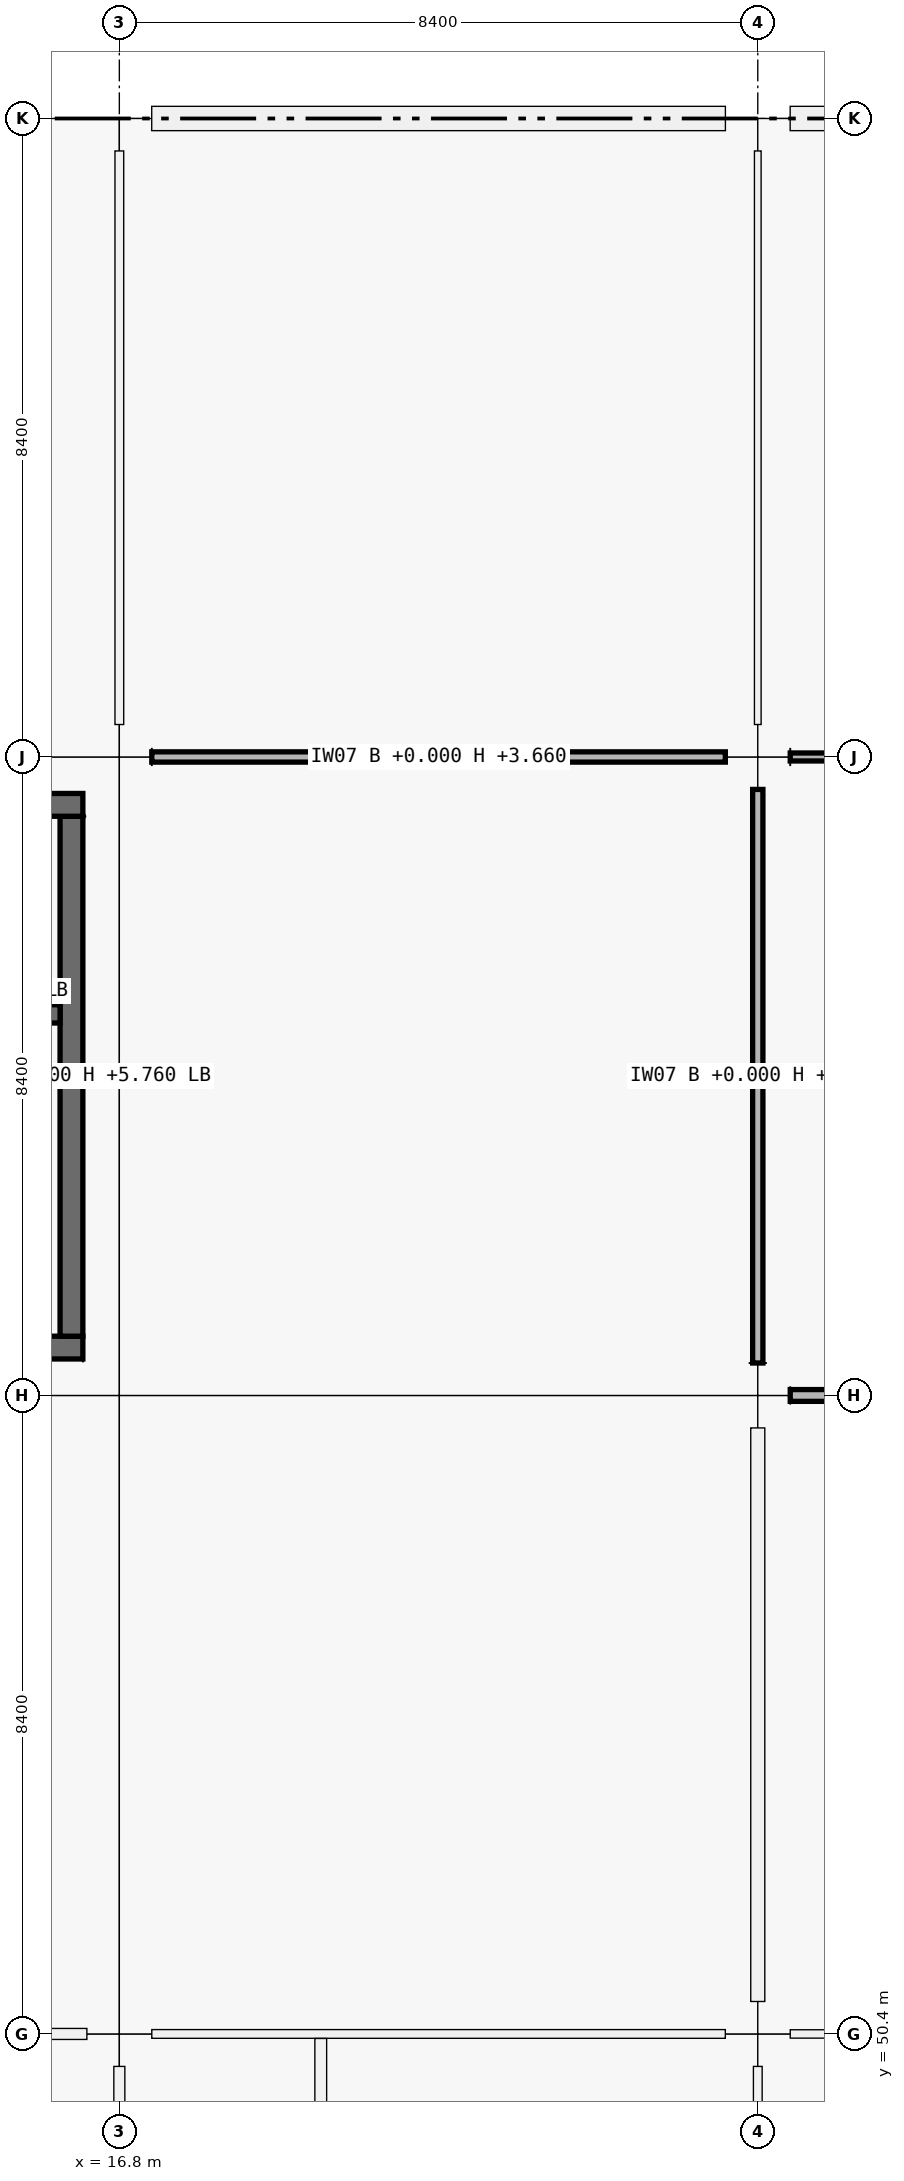
"""IFC4 building model, lengths in metres.
Left out: names, types, materials, properties, quantities, classifications, styles, units other than length and angle.
Written with IfcOpenShell. Run it as: python <this file> out.ifc"""

import sys

from ifc_helpers import new_model, si_unit, direction, frame, frame_2d, origin, origin_2d, place, context, subcontext, project, spatial, rectangle, extrude, element, fill, save


model = new_model("IFC4")
c1 = context("Model", 3, precision=1e-05, world=origin(), true_north=direction((0.0, 1.0)))
c2 = subcontext(c1, "Body", "Model", "MODEL_VIEW")
j1 = project(units=[si_unit("LENGTHUNIT", "METRE"), si_unit("PLANEANGLEUNIT", "RADIAN")], contexts=[c1])
p1 = place(None, origin())
s1 = spatial("IfcSite", under=j1, at=p1, CompositionType="ELEMENT")
p2 = place(p1, origin())
s2 = spatial("IfcBuilding", under=s1, at=p2, CompositionType="ELEMENT")
p3 = place(p2, origin())
s3 = spatial("IfcBuildingStorey", under=s2, at=p3, CompositionType="ELEMENT", Elevation=0.0)
for number, where, z_axis, x_axis in (
    (1, (16.8, 50.4, 0.0), (0.0, 0.0, 1.0), (1.0, 0.0, 0.0)),
    (2, (16.8, 58.8, 0.0), (0.0, 0.0, 1.0), (1.0, 0.0, 0.0)),
    (3, (16.8, 67.2, 0.0), (0.0, 0.0, 1.0), (1.0, 0.0, 0.0)),
    (4, (16.8, 75.6, 0.0), (0.0, 0.0, 1.0), (1.0, 0.0, 0.0)),
    (5, (25.2, 50.4, 0.0), (0.0, 0.0, 1.0), (1.0, 0.0, 0.0)),
    (6, (25.2, 58.8, 0.0), (0.0, 0.0, 1.0), (1.0, 0.0, 0.0)),
    (7, (25.2, 67.2, 0.0), (0.0, 0.0, 1.0), (1.0, 0.0, 0.0)),
    (8, (25.2, 75.6, 0.0), (0.0, 0.0, 1.0), (1.0, 0.0, 0.0)),
):
    element("IfcColumn", number, at=place(p3, frame(where, z_axis=z_axis, x_axis=x_axis)), inside=s3, PredefinedType="COLUMN", context=c2, shape_type="SweptSolid", body=[
        extrude(rectangle(XDim=0.85, YDim=0.85, at=origin_2d()), origin(), (0.0, 0.0, 1.0), 5.76),
    ])
p4 = place(p3, frame((17.226, 75.6, 0.0), z_axis=(0.0, 0.0, 1.0), x_axis=(1.0, 0.0, 0.0)))
e9 = element("IfcWall", 9, at=p4, inside=s3, PredefinedType="SOLIDWALL", context=c2, shape_type="SweptSolid", body=[
    extrude(rectangle(XDim=7.548, YDim=0.32, at=frame_2d((3.774, 0.0))), origin(), (0.0, 0.0, 1.0), 4.7),
])
p5 = place(p4, frame((2.474, 0.0, 0.9)))
e10 = element("IfcOpeningElement", 10, at=p5, cuts=e9, PredefinedType="OPENING", context=c2, shape_type="SweptSolid", body=[
    extrude(rectangle(XDim=2.6, YDim=2.1, at=frame_2d((1.3, 1.05))), frame((0.0, 0.16, 0.0), z_axis=(0.0, -1.0, 0.0), x_axis=(1.0, 0.0, 0.0)), (0.0, 0.0, 1.0), 0.32),
])
p6 = place(p3, frame((25.626, 75.6, 0.0), z_axis=(0.0, 0.0, 1.0), x_axis=(1.0, 0.0, 0.0)))
e11 = element("IfcWall", 11, at=p6, inside=s3, PredefinedType="SOLIDWALL", context=c2, shape_type="SweptSolid", body=[
    extrude(rectangle(XDim=7.548, YDim=0.32, at=frame_2d((3.774, 0.0))), origin(), (0.0, 0.0, 1.0), 4.7),
])
p7 = place(p6, frame((2.374, 0.0, 0.9)))
e12 = element("IfcOpeningElement", 12, at=p7, cuts=e11, PredefinedType="OPENING", context=c2, shape_type="SweptSolid", body=[
    extrude(rectangle(XDim=2.8, YDim=1.75, at=frame_2d((1.4, 0.875))), frame((0.0, 0.16, 0.0), z_axis=(0.0, -1.0, 0.0), x_axis=(1.0, 0.0, 0.0)), (0.0, 0.0, 1.0), 0.32),
])
p8 = place(p3, frame((16.32, 59.43, 0.0), z_axis=(0.0, 0.0, 1.0), x_axis=(-1.0, 0.0, 0.0)))
e13 = element("IfcWall", 13, at=p8, inside=s3, PredefinedType="SHEAR", context=c2, shape_type="SweptSolid", body=[
    extrude(rectangle(XDim=7.44, YDim=0.3, at=frame_2d((3.72, 0.0))), origin(), (0.0, 0.0, 1.0), 5.76),
])
p9 = place(p8, frame((1.28, 0.0, 0.0)))
e14 = element("IfcOpeningElement", 14, at=p9, cuts=e13, PredefinedType="OPENING", context=c2, shape_type="SweptSolid", body=[
    extrude(rectangle(XDim=1.5, YDim=2.15, at=frame_2d((0.75, 1.075))), frame((0.0, 0.15, 0.0), z_axis=(0.0, -1.0, 0.0), x_axis=(1.0, 0.0, 0.0)), (0.0, 0.0, 1.0), 0.3),
])
p10 = place(p3, frame((8.88, 66.57, 0.0), z_axis=(0.0, 0.0, 1.0), x_axis=(1.0, 0.0, 0.0)))
e15 = element("IfcWall", 15, at=p10, inside=s3, PredefinedType="SHEAR", context=c2, shape_type="SweptSolid", body=[
    extrude(rectangle(XDim=7.44, YDim=0.3, at=frame_2d((3.72, 0.0))), origin(), (0.0, 0.0, 1.0), 5.76),
])
p11 = place(p3, frame((16.17, 66.42, 0.0), z_axis=(0.0, 0.0, 1.0), x_axis=(0.0, -1.0, 0.0)))
e16 = element("IfcWall", 16, at=p11, inside=s3, PredefinedType="SHEAR", context=c2, shape_type="SweptSolid", body=[
    extrude(rectangle(XDim=6.84, YDim=0.3, at=frame_2d((3.42, 0.0))), origin(), (0.0, 0.0, 1.0), 5.76),
])
p12 = place(p3, frame((12.56, 63.82, 0.0), z_axis=(0.0, 0.0, 1.0), x_axis=(1.0, 0.0, 0.0)))
e17 = element("IfcWall", 17, at=p12, inside=s3, PredefinedType="SHEAR", context=c2, shape_type="SweptSolid", body=[
    extrude(rectangle(XDim=3.46, YDim=0.24, at=frame_2d((1.73, 0.0))), origin(), (0.0, 0.0, 1.0), 5.76),
])
p13 = place(p12, frame((1.18, 0.0, 0.0)))
e18 = element("IfcOpeningElement", 18, at=p13, cuts=e17, PredefinedType="OPENING", context=c2, shape_type="SweptSolid", body=[
    extrude(rectangle(XDim=1.1, YDim=2.15, at=frame_2d((0.55, 1.075))), frame((0.0, 0.12, 0.0), z_axis=(0.0, -1.0, 0.0), x_axis=(1.0, 0.0, 0.0)), (0.0, 0.0, 1.0), 0.24),
])
p14 = place(p3, frame((8.827, 50.4, 0.0), z_axis=(0.0, 0.0, 1.0), x_axis=(1.0, 0.0, 0.0)))
e19 = element("IfcWall", 19, at=p14, inside=s3, PredefinedType="PARTITIONING", context=c2, shape_type="SweptSolid", body=[
    extrude(rectangle(XDim=7.546, YDim=0.145, at=frame_2d((3.773, 0.0))), origin(), (0.0, 0.0, 1.0), 3.66),
])
p15 = place(p14, frame((3.263, 0.0, 0.0)))
e20 = element("IfcOpeningElement", 20, at=p15, cuts=e19, PredefinedType="OPENING", context=c2, shape_type="SweptSolid", body=[
    extrude(rectangle(XDim=1.02, YDim=2.2, at=frame_2d((0.51, 1.1))), frame((0.0, 0.073, 0.0), z_axis=(0.0, -1.0, 0.0), x_axis=(1.0, 0.0, 0.0)), (0.0, 0.0, 1.0), 0.145),
])
p16 = place(p3, frame((17.227, 50.4, 0.0), z_axis=(0.0, 0.0, 1.0), x_axis=(1.0, 0.0, 0.0)))
e21 = element("IfcWall", 21, at=p16, inside=s3, PredefinedType="PARTITIONING", context=c2, shape_type="SweptSolid", body=[
    extrude(rectangle(XDim=7.546, YDim=0.115, at=frame_2d((3.773, 0.0))), origin(), (0.0, 0.0, 1.0), 3.66),
])
p17 = place(p16, frame((0.578, 0.0, 0.0)))
e22 = element("IfcOpeningElement", 22, at=p17, cuts=e21, PredefinedType="OPENING", context=c2, shape_type="SweptSolid", body=[
    extrude(rectangle(XDim=0.92, YDim=2.1, at=frame_2d((0.46, 1.05))), frame((0.0, 0.058, 0.0), z_axis=(0.0, -1.0, 0.0), x_axis=(1.0, 0.0, 0.0)), (0.0, 0.0, 1.0), 0.115),
])
p18 = place(p16, frame((4.468, 0.0, 0.0)))
e23 = element("IfcOpeningElement", 23, at=p18, cuts=e21, PredefinedType="OPENING", context=c2, shape_type="SweptSolid", body=[
    extrude(rectangle(XDim=0.98, YDim=2.08, at=frame_2d((0.49, 1.04))), frame((0.0, 0.058, 0.0), z_axis=(0.0, -1.0, 0.0), x_axis=(1.0, 0.0, 0.0)), (0.0, 0.0, 1.0), 0.115),
])
p19 = place(p3, frame((17.227, 67.2, 0.0), z_axis=(0.0, 0.0, 1.0), x_axis=(1.0, 0.0, 0.0)))
e24 = element("IfcWall", 24, at=p19, inside=s3, PredefinedType="PARTITIONING", context=c2, shape_type="SweptSolid", body=[
    extrude(rectangle(XDim=7.546, YDim=0.135, at=frame_2d((3.773, 0.0))), origin(), (0.0, 0.0, 1.0), 3.66),
])
p20 = place(p19, frame((3.283, 0.0, 0.0)))
e25 = element("IfcOpeningElement", 25, at=p20, cuts=e24, PredefinedType="OPENING", context=c2, shape_type="SweptSolid", body=[
    extrude(rectangle(XDim=0.98, YDim=2.18, at=frame_2d((0.49, 1.09))), frame((0.0, 0.067, 0.0), z_axis=(0.0, -1.0, 0.0), x_axis=(1.0, 0.0, 0.0)), (0.0, 0.0, 1.0), 0.135),
])
p21 = place(p3, frame((25.627, 50.4, 0.0), z_axis=(0.0, 0.0, 1.0), x_axis=(1.0, 0.0, 0.0)))
e26 = element("IfcWall", 26, at=p21, inside=s3, PredefinedType="MOVABLE", context=c2, shape_type="SweptSolid", body=[
    extrude(rectangle(XDim=7.546, YDim=0.11, at=frame_2d((3.773, 0.0))), origin(), (0.0, 0.0, 1.0), 3.66),
])
p22 = place(p21, frame((3.233, 0.0, 0.0)))
e27 = element("IfcOpeningElement", 27, at=p22, cuts=e26, PredefinedType="OPENING", context=c2, shape_type="SweptSolid", body=[
    extrude(rectangle(XDim=1.08, YDim=2.25, at=frame_2d((0.54, 1.125))), frame((0.0, 0.055, 0.0), z_axis=(0.0, -1.0, 0.0), x_axis=(1.0, 0.0, 0.0)), (0.0, 0.0, 1.0), 0.11),
])
p23 = place(p3, frame((25.627, 58.8, 0.0), z_axis=(0.0, 0.0, 1.0), x_axis=(1.0, 0.0, 0.0)))
e28 = element("IfcWall", 28, at=p23, inside=s3, PredefinedType="PARTITIONING", context=c2, shape_type="SweptSolid", body=[
    extrude(rectangle(XDim=7.546, YDim=0.155, at=frame_2d((3.773, 0.0))), origin(), (0.0, 0.0, 1.0), 3.66),
])
p24 = place(p23, frame((3.243, 0.0, 0.0)))
e29 = element("IfcOpeningElement", 29, at=p24, cuts=e28, PredefinedType="OPENING", context=c2, shape_type="SweptSolid", body=[
    extrude(rectangle(XDim=1.06, YDim=2.25, at=frame_2d((0.53, 1.125))), frame((0.0, 0.078, 0.0), z_axis=(0.0, -1.0, 0.0), x_axis=(1.0, 0.0, 0.0)), (0.0, 0.0, 1.0), 0.155),
])
p25 = place(p3, frame((25.627, 67.2, 0.0), z_axis=(0.0, 0.0, 1.0), x_axis=(1.0, 0.0, 0.0)))
e30 = element("IfcWall", 30, at=p25, inside=s3, PredefinedType="PARTITIONING", context=c2, shape_type="SweptSolid", body=[
    extrude(rectangle(XDim=7.546, YDim=0.105, at=frame_2d((3.773, 0.0))), origin(), (0.0, 0.0, 1.0), 3.66),
])
p26 = place(p25, frame((3.248, 0.0, 0.0)))
e31 = element("IfcOpeningElement", 31, at=p26, cuts=e30, PredefinedType="OPENING", context=c2, shape_type="SweptSolid", body=[
    extrude(rectangle(XDim=1.05, YDim=2.12, at=frame_2d((0.525, 1.06))), frame((0.0, 0.052, 0.0), z_axis=(0.0, -1.0, 0.0), x_axis=(1.0, 0.0, 0.0)), (0.0, 0.0, 1.0), 0.105),
])
p27 = place(p3, frame((16.8, 42.427, 0.0), z_axis=(0.0, 0.0, 1.0), x_axis=(0.0, 1.0, 0.0)))
e32 = element("IfcWall", 32, at=p27, inside=s3, PredefinedType="PARTITIONING", context=c2, shape_type="SweptSolid", body=[
    extrude(rectangle(XDim=7.546, YDim=0.145, at=frame_2d((3.773, 0.0))), origin(), (0.0, 0.0, 1.0), 3.66),
])
p28 = place(p3, frame((16.8, 67.627, 0.0), z_axis=(0.0, 0.0, 1.0), x_axis=(0.0, 1.0, 0.0)))
e33 = element("IfcWall", 33, at=p28, inside=s3, PredefinedType="PARTITIONING", context=c2, shape_type="SweptSolid", body=[
    extrude(rectangle(XDim=7.546, YDim=0.115, at=frame_2d((3.773, 0.0))), origin(), (0.0, 0.0, 1.0), 3.66),
])
p29 = place(p28, frame((3.248, 0.0, 0.0)))
e34 = element("IfcOpeningElement", 34, at=p29, cuts=e33, PredefinedType="OPENING", context=c2, shape_type="SweptSolid", body=[
    extrude(rectangle(XDim=1.05, YDim=2.12, at=frame_2d((0.525, 1.06))), frame((0.0, 0.058, 0.0), z_axis=(0.0, -1.0, 0.0), x_axis=(1.0, 0.0, 0.0)), (0.0, 0.0, 1.0), 0.115),
])
p30 = place(p3, frame((25.2, 42.427, 0.0), z_axis=(0.0, 0.0, 1.0), x_axis=(0.0, 1.0, 0.0)))
e35 = element("IfcWall", 35, at=p30, inside=s3, PredefinedType="PARTITIONING", context=c2, shape_type="SweptSolid", body=[
    extrude(rectangle(XDim=7.546, YDim=0.115, at=frame_2d((3.773, 0.0))), origin(), (0.0, 0.0, 1.0), 3.66),
])
p31 = place(p3, frame((25.2, 50.827, 0.0), z_axis=(0.0, 0.0, 1.0), x_axis=(0.0, 1.0, 0.0)))
e36 = element("IfcWall", 36, at=p31, inside=s3, PredefinedType="PARTITIONING", context=c2, shape_type="SweptSolid", body=[
    extrude(rectangle(XDim=7.546, YDim=0.185, at=frame_2d((3.773, 0.0))), origin(), (0.0, 0.0, 1.0), 3.66),
])
p32 = place(p31, frame((3.303, 0.0, 0.0)))
e37 = element("IfcOpeningElement", 37, at=p32, cuts=e36, PredefinedType="OPENING", context=c2, shape_type="SweptSolid", body=[
    extrude(rectangle(XDim=0.94, YDim=2.15, at=frame_2d((0.47, 1.075))), frame((0.0, 0.093, 0.0), z_axis=(0.0, -1.0, 0.0), x_axis=(1.0, 0.0, 0.0)), (0.0, 0.0, 1.0), 0.185),
])
p33 = place(p3, frame((25.2, 59.227, 0.0), z_axis=(0.0, 0.0, 1.0), x_axis=(0.0, 1.0, 0.0)))
e38 = element("IfcWall", 38, at=p33, inside=s3, PredefinedType="PARTITIONING", context=c2, shape_type="SweptSolid", body=[
    extrude(rectangle(XDim=7.546, YDim=0.135, at=frame_2d((3.773, 0.0))), origin(), (0.0, 0.0, 1.0), 3.66),
])
p34 = place(p33, frame((3.313, 0.0, 0.0)))
e39 = element("IfcOpeningElement", 39, at=p34, cuts=e38, PredefinedType="OPENING", context=c2, shape_type="SweptSolid", body=[
    extrude(rectangle(XDim=0.92, YDim=2.15, at=frame_2d((0.46, 1.075))), frame((0.0, 0.067, 0.0), z_axis=(0.0, -1.0, 0.0), x_axis=(1.0, 0.0, 0.0)), (0.0, 0.0, 1.0), 0.135),
])
p35 = place(p3, frame((25.2, 67.627, 0.0), z_axis=(0.0, 0.0, 1.0), x_axis=(0.0, 1.0, 0.0)))
e40 = element("IfcWall", 40, at=p35, inside=s3, PredefinedType="PARTITIONING", context=c2, shape_type="SweptSolid", body=[
    extrude(rectangle(XDim=7.546, YDim=0.088, at=frame_2d((3.773, 0.0))), origin(), (0.0, 0.0, 1.0), 3.66),
])
p36 = place(p35, frame((3.288, 0.0, 0.0)))
e41 = element("IfcOpeningElement", 41, at=p36, cuts=e40, PredefinedType="OPENING", context=c2, shape_type="SweptSolid", body=[
    extrude(rectangle(XDim=0.97, YDim=2.12, at=frame_2d((0.485, 1.06))), frame((0.0, 0.044, 0.0), z_axis=(0.0, -1.0, 0.0), x_axis=(1.0, 0.0, 0.0)), (0.0, 0.0, 1.0), 0.088),
])
p37 = place(p3, frame((19.45, 42.084, 0.0), z_axis=(0.0, 0.0, 1.0), x_axis=(0.0, 1.0, 0.0)))
e42 = element("IfcWall", 42, at=p37, inside=s3, PredefinedType="PARTITIONING", context=c2, shape_type="SweptSolid", body=[
    extrude(rectangle(XDim=8.256, YDim=0.155, at=frame_2d((4.128, 0.0))), origin(), (0.0, 0.0, 1.0), 3.66),
])
p38 = place(p5, origin())
e43 = element("IfcWindow", 43, at=p38, inside=s3, PartitioningType="SINGLE_PANEL", PredefinedType="WINDOW", context=c2, shape_type="SweptSolid", body=[
    extrude(rectangle(XDim=2.6, YDim=2.1, at=frame_2d((1.3, 1.05))), frame((0.0, 0.03, 0.0), z_axis=(0.0, -1.0, 0.0), x_axis=(1.0, 0.0, 0.0)), (0.0, 0.0, 1.0), 0.06),
])
fill(e10, e43)
p39 = place(p17, origin())
e44 = element("IfcDoor", 44, at=p39, inside=s3, OperationType="SINGLE_SWING_LEFT", PredefinedType="DOOR", context=c2, shape_type="SweptSolid", body=[
    extrude(rectangle(XDim=0.92, YDim=2.1, at=frame_2d((0.46, 1.05))), frame((0.0, 0.025, 0.0), z_axis=(0.0, -1.0, 0.0), x_axis=(1.0, 0.0, 0.0)), (0.0, 0.0, 1.0), 0.05),
])
fill(e22, e44)
p40 = place(p18, origin())
e45 = element("IfcDoor", 45, at=p40, inside=s3, OperationType="SINGLE_SWING_RIGHT", PredefinedType="DOOR", context=c2, shape_type="SweptSolid", body=[
    extrude(rectangle(XDim=0.98, YDim=2.08, at=frame_2d((0.49, 1.04))), frame((0.0, 0.025, 0.0), z_axis=(0.0, -1.0, 0.0), x_axis=(1.0, 0.0, 0.0)), (0.0, 0.0, 1.0), 0.05),
])
fill(e23, e45)
p41 = place(p20, origin())
e46 = element("IfcDoor", 46, at=p41, inside=s3, OperationType="SINGLE_SWING_RIGHT", PredefinedType="DOOR", context=c2, shape_type="SweptSolid", body=[
    extrude(rectangle(XDim=0.98, YDim=2.18, at=frame_2d((0.49, 1.09))), frame((0.0, 0.025, 0.0), z_axis=(0.0, -1.0, 0.0), x_axis=(1.0, 0.0, 0.0)), (0.0, 0.0, 1.0), 0.05),
])
fill(e25, e46)
p42 = place(p32, origin())
e47 = element("IfcDoor", 47, at=p42, inside=s3, OperationType="SINGLE_SWING_LEFT", PredefinedType="DOOR", context=c2, shape_type="SweptSolid", body=[
    extrude(rectangle(XDim=0.94, YDim=2.15, at=frame_2d((0.47, 1.075))), frame((0.0, 0.025, 0.0), z_axis=(0.0, -1.0, 0.0), x_axis=(1.0, 0.0, 0.0)), (0.0, 0.0, 1.0), 0.05),
])
fill(e37, e47)
p43 = place(p34, origin())
e48 = element("IfcDoor", 48, at=p43, inside=s3, OperationType="SINGLE_SWING_RIGHT", PredefinedType="DOOR", context=c2, shape_type="SweptSolid", body=[
    extrude(rectangle(XDim=0.92, YDim=2.15, at=frame_2d((0.46, 1.075))), frame((0.0, 0.025, 0.0), z_axis=(0.0, -1.0, 0.0), x_axis=(1.0, 0.0, 0.0)), (0.0, 0.0, 1.0), 0.05),
])
fill(e39, e48)
p44 = place(p29, origin())
e49 = element("IfcDoor", 49, at=p44, inside=s3, OperationType="SINGLE_SWING_RIGHT", PredefinedType="DOOR", context=c2, shape_type="SweptSolid", body=[
    extrude(rectangle(XDim=1.05, YDim=2.12, at=frame_2d((0.525, 1.06))), frame((0.0, 0.025, 0.0), z_axis=(0.0, -1.0, 0.0), x_axis=(1.0, 0.0, 0.0)), (0.0, 0.0, 1.0), 0.05),
])
fill(e34, e49)
p45 = place(p36, origin())
e50 = element("IfcDoor", 50, at=p45, inside=s3, OperationType="SINGLE_SWING_RIGHT", PredefinedType="DOOR", context=c2, shape_type="SweptSolid", body=[
    extrude(rectangle(XDim=0.97, YDim=2.12, at=frame_2d((0.485, 1.06))), frame((0.0, 0.025, 0.0), z_axis=(0.0, -1.0, 0.0), x_axis=(1.0, 0.0, 0.0)), (0.0, 0.0, 1.0), 0.05),
])
fill(e41, e50)
save(model, sys.argv[1])
